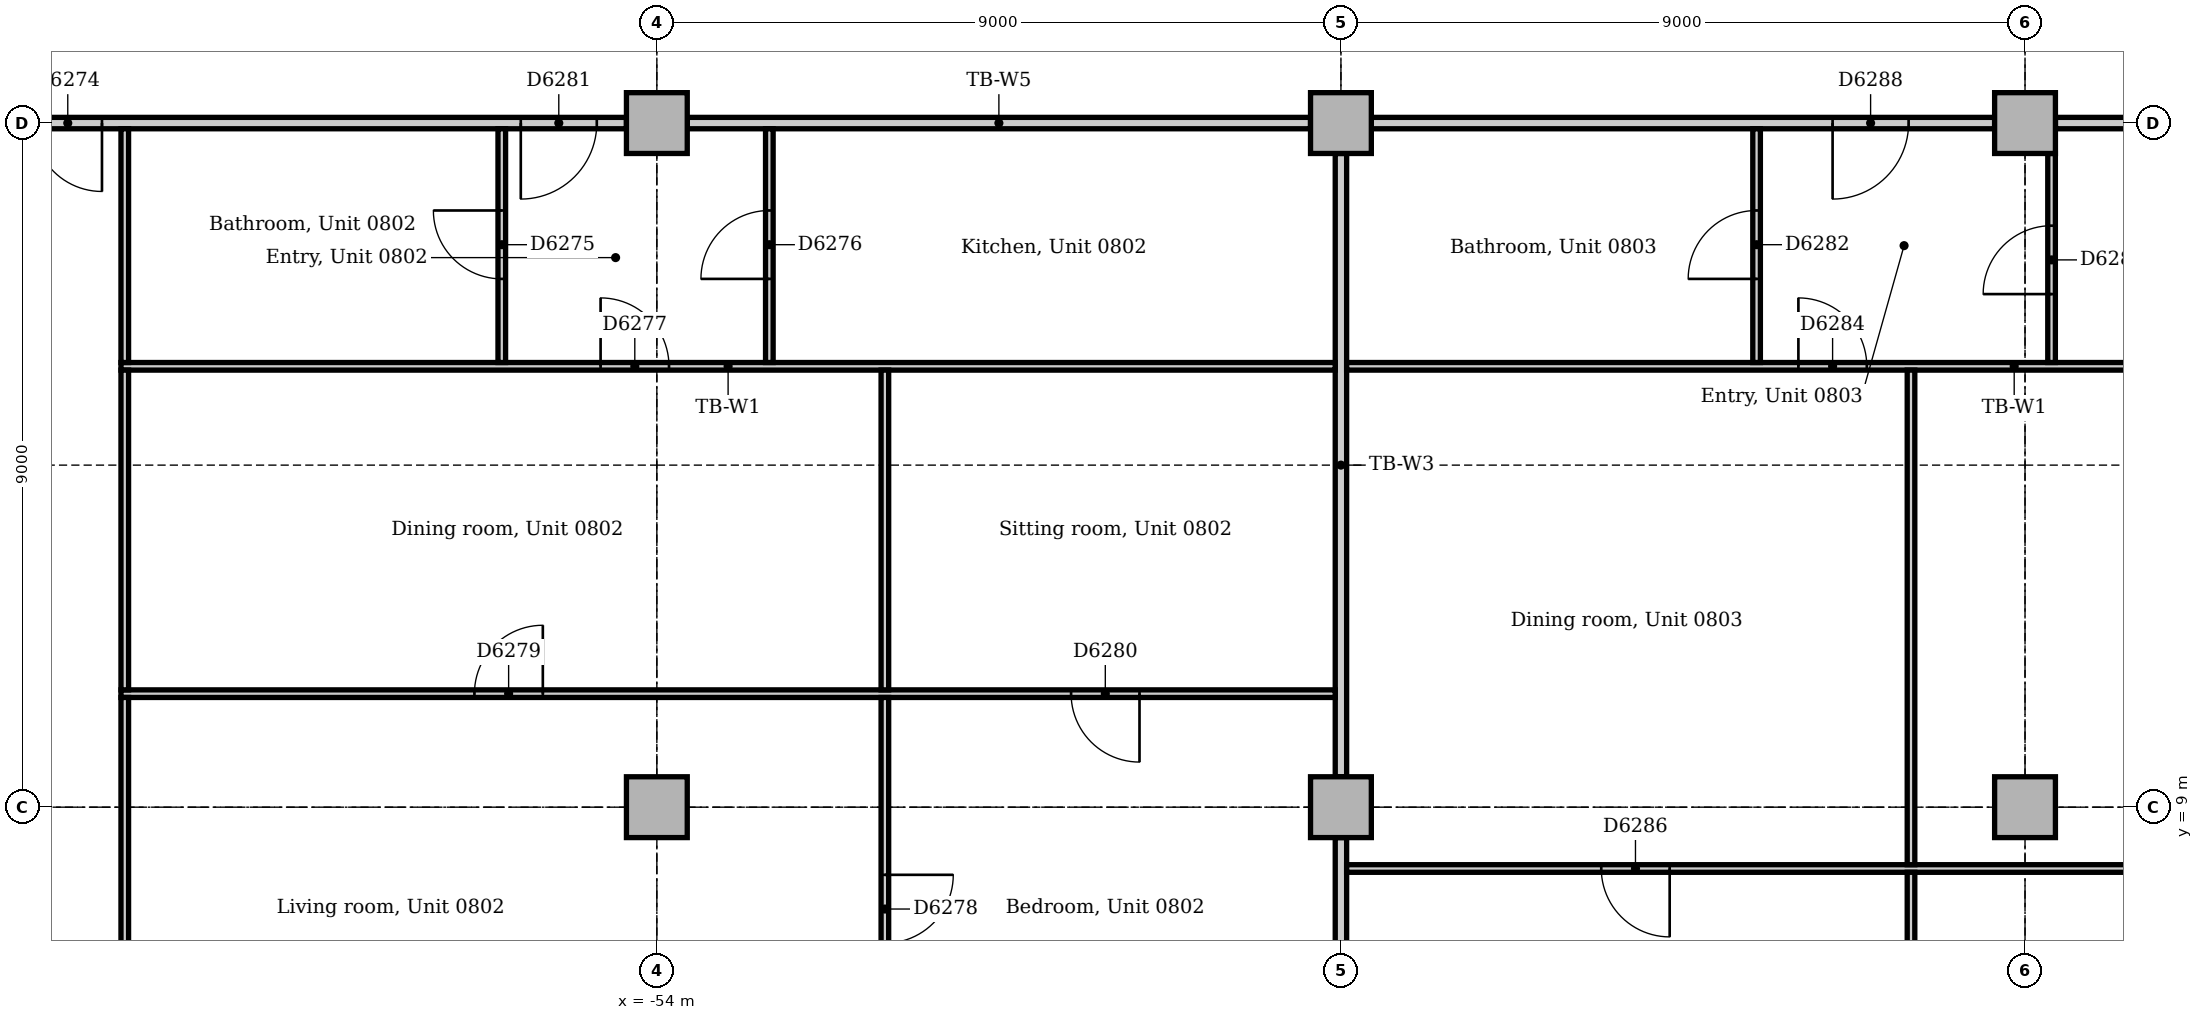
"""IFC4 building model, lengths in metres.
Left out: names, types, materials, properties, quantities, classifications, styles, units other than length and angle.
Written with IfcOpenShell. Run it as: python <this file> out.ifc"""

import sys

from ifc_helpers import new_model, si_unit, direction, frame, frame_2d, origin, origin_2d, place, context, subcontext, project, spatial, rectangle, extrude, element, fill, save


model = new_model("IFC4")
c1 = context("Model", 3, precision=1e-05, world=origin(), true_north=direction((0.0, 1.0)))
c2 = subcontext(c1, "Body", "Model", "MODEL_VIEW")
j1 = project(units=[si_unit("LENGTHUNIT", "METRE"), si_unit("PLANEANGLEUNIT", "RADIAN")], contexts=[c1])
p1 = place(None, origin())
s1 = spatial("IfcSite", under=j1, at=p1, CompositionType="ELEMENT")
p2 = place(p1, origin())
s2 = spatial("IfcBuilding", under=s1, at=p2, CompositionType="ELEMENT")
p3 = place(p2, frame((0.0, 0.0, 38.0)))
s3 = spatial("IfcBuildingStorey", under=s2, at=p3, CompositionType="ELEMENT", Elevation=38.0)
for number, where, z_axis, x_axis in (
    (1, (-54.0, 9.0, 0.0), (0.0, 0.0, 1.0), (1.0, 0.0, 0.0)),
    (2, (-54.0, 18.0, 0.0), (0.0, 0.0, 1.0), (1.0, 0.0, 0.0)),
    (3, (-45.0, 9.0, 0.0), (0.0, 0.0, 1.0), (1.0, 0.0, 0.0)),
    (4, (-45.0, 18.0, 0.0), (0.0, 0.0, 1.0), (1.0, 0.0, 0.0)),
    (5, (-36.0, 9.0, 0.0), (0.0, 0.0, 1.0), (1.0, 0.0, 0.0)),
    (6, (-36.0, 18.0, 0.0), (0.0, 0.0, 1.0), (1.0, 0.0, 0.0)),
):
    element("IfcColumn", number, at=place(p3, frame(where, z_axis=z_axis, x_axis=x_axis)), inside=s3, PredefinedType="COLUMN", context=c2, shape_type="SweptSolid", body=[
        extrude(rectangle(XDim=0.8, YDim=0.8, at=origin_2d()), origin(), (0.0, 0.0, 1.0), 3.85),
    ])
p4 = place(p3, frame((-35.6, 18.0, 0.0), z_axis=(0.0, 0.0, 1.0), x_axis=(1.0, 0.0, 0.0)))
e7 = element("IfcWall", 7, at=p4, inside=s3, PredefinedType="PARTITIONING", context=c2, shape_type="SweptSolid", body=[
    extrude(rectangle(XDim=7.25, YDim=0.15, at=frame_2d((3.625, 0.0))), origin(), (0.0, 0.0, 1.0), 3.15),
])
p5 = place(p3, frame((-44.6, 18.0, 0.0), z_axis=(0.0, 0.0, 1.0), x_axis=(1.0, 0.0, 0.0)))
e8 = element("IfcWall", 8, at=p5, inside=s3, PredefinedType="PARTITIONING", context=c2, shape_type="SweptSolid", body=[
    extrude(rectangle(XDim=8.2, YDim=0.15, at=frame_2d((4.1, 0.0))), origin(), (0.0, 0.0, 1.0), 3.15),
])
p6 = place(p5, frame((6.068, 0.0, 0.0)))
e9 = element("IfcOpeningElement", 9, at=p6, cuts=e8, PredefinedType="OPENING", context=c2, shape_type="SweptSolid", body=[
    extrude(rectangle(XDim=1.0, YDim=2.1, at=frame_2d((0.5, 1.05))), frame((0.0, 0.085, 0.0), z_axis=(0.0, -1.0, 0.0), x_axis=(1.0, 0.0, 0.0)), (0.0, 0.0, 1.0), 0.17),
])
p7 = place(p3, frame((-53.6, 18.0, 0.0), z_axis=(0.0, 0.0, 1.0), x_axis=(1.0, 0.0, 0.0)))
e10 = element("IfcWall", 10, at=p7, inside=s3, PredefinedType="PARTITIONING", context=c2, shape_type="SweptSolid", body=[
    extrude(rectangle(XDim=8.2, YDim=0.15, at=frame_2d((4.1, 0.0))), origin(), (0.0, 0.0, 1.0), 3.15),
])
p8 = place(p3, frame((-62.6, 18.0, 0.0), z_axis=(0.0, 0.0, 1.0), x_axis=(1.0, 0.0, 0.0)))
e11 = element("IfcWall", 11, at=p8, inside=s3, PredefinedType="PARTITIONING", context=c2, shape_type="SweptSolid", body=[
    extrude(rectangle(XDim=8.2, YDim=0.15, at=frame_2d((4.1, 0.0))), origin(), (0.0, 0.0, 1.0), 3.15),
])
p9 = place(p8, frame((0.4, 0.0, 0.0)))
e12 = element("IfcOpeningElement", 12, at=p9, cuts=e11, PredefinedType="OPENING", context=c2, shape_type="SweptSolid", body=[
    extrude(rectangle(XDim=0.9, YDim=2.1, at=frame_2d((0.45, 1.05))), frame((0.0, 0.085, 0.0), z_axis=(0.0, -1.0, 0.0), x_axis=(1.0, 0.0, 0.0)), (0.0, 0.0, 1.0), 0.17),
])
p10 = place(p8, frame((6.81, 0.0, 0.0)))
e13 = element("IfcOpeningElement", 13, at=p10, cuts=e11, PredefinedType="OPENING", context=c2, shape_type="SweptSolid", body=[
    extrude(rectangle(XDim=1.0, YDim=2.1, at=frame_2d((0.5, 1.05))), frame((0.0, 0.085, 0.0), z_axis=(0.0, -1.0, 0.0), x_axis=(1.0, 0.0, 0.0)), (0.0, 0.0, 1.0), 0.17),
])
p11 = place(p3, frame((-45.0, 9.4, 0.0), z_axis=(0.0, 0.0, 1.0), x_axis=(0.0, 1.0, 0.0)))
e14 = element("IfcWall", 14, at=p11, inside=s3, PredefinedType="PARTITIONING", context=c2, shape_type="SweptSolid", body=[
    extrude(rectangle(XDim=8.2, YDim=0.15, at=frame_2d((4.1, 0.0))), origin(), (0.0, 0.0, 1.0), 3.158),
])
p12 = place(p3, frame((-45.0, 5.85, 0.0), z_axis=(0.0, 0.0, 1.0), x_axis=(0.0, 1.0, 0.0)))
e15 = element("IfcWall", 15, at=p12, inside=s3, PredefinedType="PARTITIONING", context=c2, shape_type="SweptSolid", body=[
    extrude(rectangle(XDim=2.75, YDim=0.15, at=frame_2d((1.375, 0.0))), origin(), (0.0, 0.0, 1.0), 3.652),
])
p13 = place(p3, frame((-61.05, 14.8, 0.0), z_axis=(0.0, 0.0, 1.0), x_axis=(1.0, 0.0, 0.0)))
e16 = element("IfcWall", 16, at=p13, inside=s3, PredefinedType="PARTITIONING", context=c2, shape_type="SweptSolid", body=[
    extrude(rectangle(XDim=15.975, YDim=0.1, at=frame_2d((7.987, 0.0))), origin(), (0.0, 0.0, 1.0), 3.85),
])
p14 = place(p13, frame((6.31, 0.0, 0.0)))
e17 = element("IfcOpeningElement", 17, at=p14, cuts=e16, PredefinedType="OPENING", context=c2, shape_type="SweptSolid", body=[
    extrude(rectangle(XDim=0.9, YDim=2.1, at=frame_2d((0.45, 1.05))), frame((0.0, 0.06, 0.0), z_axis=(0.0, -1.0, 0.0), x_axis=(1.0, 0.0, 0.0)), (0.0, 0.0, 1.0), 0.12),
])
p15 = place(p3, frame((-44.925, 14.8, 0.0), z_axis=(0.0, 0.0, 1.0), x_axis=(1.0, 0.0, 0.0)))
e18 = element("IfcWall", 18, at=p15, inside=s3, PredefinedType="PARTITIONING", context=c2, shape_type="SweptSolid", body=[
    extrude(rectangle(XDim=17.565, YDim=0.1, at=frame_2d((8.783, 0.0))), origin(), (0.0, 0.0, 1.0), 3.85),
])
p16 = place(p15, frame((5.943, 0.0, 0.0)))
e19 = element("IfcOpeningElement", 19, at=p16, cuts=e18, PredefinedType="OPENING", context=c2, shape_type="SweptSolid", body=[
    extrude(rectangle(XDim=0.9, YDim=2.1, at=frame_2d((0.45, 1.05))), frame((0.0, 0.06, 0.0), z_axis=(0.0, -1.0, 0.0), x_axis=(1.0, 0.0, 0.0)), (0.0, 0.0, 1.0), 0.12),
])
p17 = place(p3, frame((-44.925, 8.193, 0.0), z_axis=(0.0, 0.0, 1.0), x_axis=(1.0, 0.0, 0.0)))
e20 = element("IfcWall", 20, at=p17, inside=s3, PredefinedType="PARTITIONING", context=c2, shape_type="SweptSolid", body=[
    extrude(rectangle(XDim=15.922, YDim=0.1, at=frame_2d((7.961, 0.0))), origin(), (0.0, 0.0, 1.0), 3.85),
])
p18 = place(p17, frame((3.35, 0.0, 0.0)))
e21 = element("IfcOpeningElement", 21, at=p18, cuts=e20, PredefinedType="OPENING", context=c2, shape_type="SweptSolid", body=[
    extrude(rectangle(XDim=0.9, YDim=2.1, at=frame_2d((0.45, 1.05))), frame((0.0, 0.06, 0.0), z_axis=(0.0, -1.0, 0.0), x_axis=(1.0, 0.0, 0.0)), (0.0, 0.0, 1.0), 0.12),
])
p19 = place(p17, frame((11.125, 0.0, 0.0)))
e22 = element("IfcOpeningElement", 22, at=p19, cuts=e20, PredefinedType="OPENING", context=c2, shape_type="SweptSolid", body=[
    extrude(rectangle(XDim=0.9, YDim=2.1, at=frame_2d((0.45, 1.05))), frame((0.0, 0.06, 0.0), z_axis=(0.0, -1.0, 0.0), x_axis=(1.0, 0.0, 0.0)), (0.0, 0.0, 1.0), 0.12),
])
p20 = place(p3, frame((-61.05, 10.493, 0.0), z_axis=(0.0, 0.0, 1.0), x_axis=(1.0, 0.0, 0.0)))
e23 = element("IfcWall", 23, at=p20, inside=s3, PredefinedType="PARTITIONING", context=c2, shape_type="SweptSolid", body=[
    extrude(rectangle(XDim=15.975, YDim=0.1, at=frame_2d((7.987, 0.0))), origin(), (0.0, 0.0, 1.0), 3.85),
])
p21 = place(p20, frame((4.65, 0.0, 0.0)))
e24 = element("IfcOpeningElement", 24, at=p21, cuts=e23, PredefinedType="OPENING", context=c2, shape_type="SweptSolid", body=[
    extrude(rectangle(XDim=0.9, YDim=2.1, at=frame_2d((0.45, 1.05))), frame((0.0, 0.06, 0.0), z_axis=(0.0, -1.0, 0.0), x_axis=(1.0, 0.0, 0.0)), (0.0, 0.0, 1.0), 0.12),
])
p22 = place(p20, frame((12.5, 0.0, 0.0)))
e25 = element("IfcOpeningElement", 25, at=p22, cuts=e23, PredefinedType="OPENING", context=c2, shape_type="SweptSolid", body=[
    extrude(rectangle(XDim=0.9, YDim=2.1, at=frame_2d((0.45, 1.05))), frame((0.0, 0.06, 0.0), z_axis=(0.0, -1.0, 0.0), x_axis=(1.0, 0.0, 0.0)), (0.0, 0.0, 1.0), 0.12),
])
p23 = place(p3, frame((-61.0, 14.85, 0.0), z_axis=(0.0, 0.0, 1.0), x_axis=(0.0, 1.0, 0.0)))
e26 = element("IfcWall", 26, at=p23, inside=s3, PredefinedType="PARTITIONING", context=c2, shape_type="SweptSolid", body=[
    extrude(rectangle(XDim=3.075, YDim=0.1, at=frame_2d((1.538, 0.0))), origin(), (0.0, 0.0, 1.0), 3.85),
])
p24 = place(p3, frame((-61.0, 10.543, 0.0), z_axis=(0.0, 0.0, 1.0), x_axis=(0.0, 1.0, 0.0)))
e27 = element("IfcWall", 27, at=p24, inside=s3, PredefinedType="PARTITIONING", context=c2, shape_type="SweptSolid", body=[
    extrude(rectangle(XDim=4.207, YDim=0.1, at=frame_2d((2.103, 0.0))), origin(), (0.0, 0.0, 1.0), 3.85),
])
p25 = place(p3, frame((-61.0, 4.86, 0.0), z_axis=(0.0, 0.0, 1.0), x_axis=(0.0, 1.0, 0.0)))
e28 = element("IfcWall", 28, at=p25, inside=s3, PredefinedType="PARTITIONING", context=c2, shape_type="SweptSolid", body=[
    extrude(rectangle(XDim=5.583, YDim=0.1, at=frame_2d((2.792, 0.0))), origin(), (0.0, 0.0, 1.0), 3.85),
])
p26 = place(p3, frame((-51.0, 10.543, 0.0), z_axis=(0.0, 0.0, 1.0), x_axis=(0.0, 1.0, 0.0)))
e29 = element("IfcWall", 29, at=p26, inside=s3, PredefinedType="PARTITIONING", context=c2, shape_type="SweptSolid", body=[
    extrude(rectangle(XDim=4.207, YDim=0.1, at=frame_2d((2.103, 0.0))), origin(), (0.0, 0.0, 1.0), 3.85),
])
p27 = place(p3, frame((-51.0, 4.86, 0.0), z_axis=(0.0, 0.0, 1.0), x_axis=(0.0, 1.0, 0.0)))
e30 = element("IfcWall", 30, at=p27, inside=s3, PredefinedType="PARTITIONING", context=c2, shape_type="SweptSolid", body=[
    extrude(rectangle(XDim=5.583, YDim=0.1, at=frame_2d((2.792, 0.0))), origin(), (0.0, 0.0, 1.0), 3.85),
])
p28 = place(p27, frame((2.35, 0.0, 0.0)))
e31 = element("IfcOpeningElement", 31, at=p28, cuts=e30, PredefinedType="OPENING", context=c2, shape_type="SweptSolid", body=[
    extrude(rectangle(XDim=0.9, YDim=2.1, at=frame_2d((0.45, 1.05))), frame((0.0, 0.06, 0.0), z_axis=(0.0, -1.0, 0.0), x_axis=(1.0, 0.0, 0.0)), (0.0, 0.0, 1.0), 0.12),
])
p29 = place(p3, frame((-37.5, 8.243, 0.0), z_axis=(0.0, 0.0, 1.0), x_axis=(0.0, 1.0, 0.0)))
e32 = element("IfcWall", 32, at=p29, inside=s3, PredefinedType="PARTITIONING", context=c2, shape_type="SweptSolid", body=[
    extrude(rectangle(XDim=6.507, YDim=0.1, at=frame_2d((3.253, 0.0))), origin(), (0.0, 0.0, 1.0), 3.85),
])
p30 = place(p3, frame((-37.5, 4.86, 0.0), z_axis=(0.0, 0.0, 1.0), x_axis=(0.0, 1.0, 0.0)))
e33 = element("IfcWall", 33, at=p30, inside=s3, PredefinedType="PARTITIONING", context=c2, shape_type="SweptSolid", body=[
    extrude(rectangle(XDim=3.283, YDim=0.1, at=frame_2d((1.642, 0.0))), origin(), (0.0, 0.0, 1.0), 3.85),
])
p31 = place(p30, frame((1.2, 0.0, 0.0)))
e34 = element("IfcOpeningElement", 34, at=p31, cuts=e33, PredefinedType="OPENING", context=c2, shape_type="SweptSolid", body=[
    extrude(rectangle(XDim=0.9, YDim=2.1, at=frame_2d((0.45, 1.05))), frame((0.0, 0.06, 0.0), z_axis=(0.0, -1.0, 0.0), x_axis=(1.0, 0.0, 0.0)), (0.0, 0.0, 1.0), 0.12),
])
p32 = place(p3, frame((-56.04, 14.85, 0.0), z_axis=(0.0, 0.0, 1.0), x_axis=(0.0, 1.0, 0.0)))
e35 = element("IfcWall", 35, at=p32, inside=s3, PredefinedType="PARTITIONING", context=c2, shape_type="SweptSolid", body=[
    extrude(rectangle(XDim=3.075, YDim=0.1, at=frame_2d((1.538, 0.0))), origin(), (0.0, 0.0, 1.0), 3.85),
])
p33 = place(p32, frame((1.1, 0.0, 0.0)))
e36 = element("IfcOpeningElement", 36, at=p33, cuts=e35, PredefinedType="OPENING", context=c2, shape_type="SweptSolid", body=[
    extrude(rectangle(XDim=0.9, YDim=2.1, at=frame_2d((0.45, 1.05))), frame((0.0, 0.06, 0.0), z_axis=(0.0, -1.0, 0.0), x_axis=(1.0, 0.0, 0.0)), (0.0, 0.0, 1.0), 0.12),
])
p34 = place(p3, frame((-52.52, 14.85, 0.0), z_axis=(0.0, 0.0, 1.0), x_axis=(0.0, 1.0, 0.0)))
e37 = element("IfcWall", 37, at=p34, inside=s3, PredefinedType="PARTITIONING", context=c2, shape_type="SweptSolid", body=[
    extrude(rectangle(XDim=3.075, YDim=0.1, at=frame_2d((1.538, 0.0))), origin(), (0.0, 0.0, 1.0), 3.85),
])
p35 = place(p34, frame((1.1, 0.0, 0.0)))
e38 = element("IfcOpeningElement", 38, at=p35, cuts=e37, PredefinedType="OPENING", context=c2, shape_type="SweptSolid", body=[
    extrude(rectangle(XDim=0.9, YDim=2.1, at=frame_2d((0.45, 1.05))), frame((0.0, 0.06, 0.0), z_axis=(0.0, -1.0, 0.0), x_axis=(1.0, 0.0, 0.0)), (0.0, 0.0, 1.0), 0.12),
])
p36 = place(p3, frame((-39.532, 14.85, 0.0), z_axis=(0.0, 0.0, 1.0), x_axis=(0.0, 1.0, 0.0)))
e39 = element("IfcWall", 39, at=p36, inside=s3, PredefinedType="PARTITIONING", context=c2, shape_type="SweptSolid", body=[
    extrude(rectangle(XDim=3.075, YDim=0.1, at=frame_2d((1.538, 0.0))), origin(), (0.0, 0.0, 1.0), 3.85),
])
p37 = place(p36, frame((1.1, 0.0, 0.0)))
e40 = element("IfcOpeningElement", 40, at=p37, cuts=e39, PredefinedType="OPENING", context=c2, shape_type="SweptSolid", body=[
    extrude(rectangle(XDim=0.9, YDim=2.1, at=frame_2d((0.45, 1.05))), frame((0.0, 0.06, 0.0), z_axis=(0.0, -1.0, 0.0), x_axis=(1.0, 0.0, 0.0)), (0.0, 0.0, 1.0), 0.12),
])
p38 = place(p3, frame((-35.651, 14.85, 0.0), z_axis=(0.0, 0.0, 1.0), x_axis=(0.0, 1.0, 0.0)))
e41 = element("IfcWall", 41, at=p38, inside=s3, PredefinedType="PARTITIONING", context=c2, shape_type="SweptSolid", body=[
    extrude(rectangle(XDim=2.75, YDim=0.1, at=frame_2d((1.375, 0.0))), origin(), (0.0, 0.0, 1.0), 3.85),
])
p39 = place(p38, frame((0.9, 0.0, 0.0)))
e42 = element("IfcOpeningElement", 42, at=p39, cuts=e41, PredefinedType="OPENING", context=c2, shape_type="SweptSolid", body=[
    extrude(rectangle(XDim=0.9, YDim=2.1, at=frame_2d((0.45, 1.05))), frame((0.0, 0.06, 0.0), z_axis=(0.0, -1.0, 0.0), x_axis=(1.0, 0.0, 0.0)), (0.0, 0.0, 1.0), 0.12),
])
p40 = place(p9, frame((0.9, 0.0, 0.0), z_axis=(0.0, 0.0, 1.0), x_axis=(-1.0, 0.0, 0.0)))
e43 = element("IfcDoor", 43, at=p40, inside=s3, OperationType="SINGLE_SWING_LEFT", PredefinedType="DOOR", context=c2, shape_type="SweptSolid", body=[
    extrude(rectangle(XDim=0.9, YDim=2.1, at=frame_2d((0.45, 1.05))), frame((0.0, 0.025, 0.0), z_axis=(0.0, -1.0, 0.0), x_axis=(1.0, 0.0, 0.0)), (0.0, 0.0, 1.0), 0.05),
])
fill(e12, e43)
p41 = place(p33, origin())
e44 = element("IfcDoor", 44, at=p41, inside=s3, OperationType="SINGLE_SWING_RIGHT", PredefinedType="DOOR", context=c2, shape_type="SweptSolid", body=[
    extrude(rectangle(XDim=0.9, YDim=2.1, at=frame_2d((0.45, 1.05))), frame((0.0, 0.025, 0.0), z_axis=(0.0, -1.0, 0.0), x_axis=(1.0, 0.0, 0.0)), (0.0, 0.0, 1.0), 0.05),
])
fill(e36, e44)
p42 = place(p35, origin())
e45 = element("IfcDoor", 45, at=p42, inside=s3, OperationType="SINGLE_SWING_LEFT", PredefinedType="DOOR", context=c2, shape_type="SweptSolid", body=[
    extrude(rectangle(XDim=0.9, YDim=2.1, at=frame_2d((0.45, 1.05))), frame((0.0, 0.025, 0.0), z_axis=(0.0, -1.0, 0.0), x_axis=(1.0, 0.0, 0.0)), (0.0, 0.0, 1.0), 0.05),
])
fill(e38, e45)
p43 = place(p14, origin())
e46 = element("IfcDoor", 46, at=p43, inside=s3, OperationType="SINGLE_SWING_LEFT", PredefinedType="DOOR", context=c2, shape_type="SweptSolid", body=[
    extrude(rectangle(XDim=0.9, YDim=2.1, at=frame_2d((0.45, 1.05))), frame((0.0, 0.025, 0.0), z_axis=(0.0, -1.0, 0.0), x_axis=(1.0, 0.0, 0.0)), (0.0, 0.0, 1.0), 0.05),
])
fill(e17, e46)
p44 = place(p28, frame((0.9, 0.0, 0.0), z_axis=(0.0, 0.0, 1.0), x_axis=(-1.0, 0.0, 0.0)))
e47 = element("IfcDoor", 47, at=p44, inside=s3, OperationType="SINGLE_SWING_LEFT", PredefinedType="DOOR", context=c2, shape_type="SweptSolid", body=[
    extrude(rectangle(XDim=0.9, YDim=2.1, at=frame_2d((0.45, 1.05))), frame((0.0, 0.025, 0.0), z_axis=(0.0, -1.0, 0.0), x_axis=(1.0, 0.0, 0.0)), (0.0, 0.0, 1.0), 0.05),
])
fill(e31, e47)
p45 = place(p21, origin())
e48 = element("IfcDoor", 48, at=p45, inside=s3, OperationType="SINGLE_SWING_RIGHT", PredefinedType="DOOR", context=c2, shape_type="SweptSolid", body=[
    extrude(rectangle(XDim=0.9, YDim=2.1, at=frame_2d((0.45, 1.05))), frame((0.0, 0.025, 0.0), z_axis=(0.0, -1.0, 0.0), x_axis=(1.0, 0.0, 0.0)), (0.0, 0.0, 1.0), 0.05),
])
fill(e24, e48)
p46 = place(p22, frame((0.9, 0.0, 0.0), z_axis=(0.0, 0.0, 1.0), x_axis=(-1.0, 0.0, 0.0)))
e49 = element("IfcDoor", 49, at=p46, inside=s3, OperationType="SINGLE_SWING_LEFT", PredefinedType="DOOR", context=c2, shape_type="SweptSolid", body=[
    extrude(rectangle(XDim=0.9, YDim=2.1, at=frame_2d((0.45, 1.05))), frame((0.0, 0.025, 0.0), z_axis=(0.0, -1.0, 0.0), x_axis=(1.0, 0.0, 0.0)), (0.0, 0.0, 1.0), 0.05),
])
fill(e25, e49)
p47 = place(p10, frame((1.0, 0.0, 0.0), z_axis=(0.0, 0.0, 1.0), x_axis=(-1.0, 0.0, 0.0)))
e50 = element("IfcDoor", 50, at=p47, inside=s3, OperationType="SINGLE_SWING_RIGHT", PredefinedType="DOOR", context=c2, shape_type="SweptSolid", body=[
    extrude(rectangle(XDim=1.0, YDim=2.1, at=frame_2d((0.5, 1.05))), frame((0.0, 0.025, 0.0), z_axis=(0.0, -1.0, 0.0), x_axis=(1.0, 0.0, 0.0)), (0.0, 0.0, 1.0), 0.05),
])
fill(e13, e50)
p48 = place(p37, origin())
e51 = element("IfcDoor", 51, at=p48, inside=s3, OperationType="SINGLE_SWING_LEFT", PredefinedType="DOOR", context=c2, shape_type="SweptSolid", body=[
    extrude(rectangle(XDim=0.9, YDim=2.1, at=frame_2d((0.45, 1.05))), frame((0.0, 0.025, 0.0), z_axis=(0.0, -1.0, 0.0), x_axis=(1.0, 0.0, 0.0)), (0.0, 0.0, 1.0), 0.05),
])
fill(e40, e51)
p49 = place(p39, origin())
e52 = element("IfcDoor", 52, at=p49, inside=s3, OperationType="SINGLE_SWING_LEFT", PredefinedType="DOOR", context=c2, shape_type="SweptSolid", body=[
    extrude(rectangle(XDim=0.9, YDim=2.1, at=frame_2d((0.45, 1.05))), frame((0.0, 0.025, 0.0), z_axis=(0.0, -1.0, 0.0), x_axis=(1.0, 0.0, 0.0)), (0.0, 0.0, 1.0), 0.05),
])
fill(e42, e52)
p50 = place(p16, origin())
e53 = element("IfcDoor", 53, at=p50, inside=s3, OperationType="SINGLE_SWING_LEFT", PredefinedType="DOOR", context=c2, shape_type="SweptSolid", body=[
    extrude(rectangle(XDim=0.9, YDim=2.1, at=frame_2d((0.45, 1.05))), frame((0.0, 0.025, 0.0), z_axis=(0.0, -1.0, 0.0), x_axis=(1.0, 0.0, 0.0)), (0.0, 0.0, 1.0), 0.05),
])
fill(e19, e53)
p51 = place(p18, frame((0.9, 0.0, 0.0), z_axis=(0.0, 0.0, 1.0), x_axis=(-1.0, 0.0, 0.0)))
e54 = element("IfcDoor", 54, at=p51, inside=s3, OperationType="SINGLE_SWING_LEFT", PredefinedType="DOOR", context=c2, shape_type="SweptSolid", body=[
    extrude(rectangle(XDim=0.9, YDim=2.1, at=frame_2d((0.45, 1.05))), frame((0.0, 0.025, 0.0), z_axis=(0.0, -1.0, 0.0), x_axis=(1.0, 0.0, 0.0)), (0.0, 0.0, 1.0), 0.05),
])
fill(e21, e54)
p52 = place(p6, frame((1.0, 0.0, 0.0), z_axis=(0.0, 0.0, 1.0), x_axis=(-1.0, 0.0, 0.0)))
e55 = element("IfcDoor", 55, at=p52, inside=s3, OperationType="SINGLE_SWING_RIGHT", PredefinedType="DOOR", context=c2, shape_type="SweptSolid", body=[
    extrude(rectangle(XDim=1.0, YDim=2.1, at=frame_2d((0.5, 1.05))), frame((0.0, 0.025, 0.0), z_axis=(0.0, -1.0, 0.0), x_axis=(1.0, 0.0, 0.0)), (0.0, 0.0, 1.0), 0.05),
])
fill(e9, e55)
save(model, sys.argv[1])
